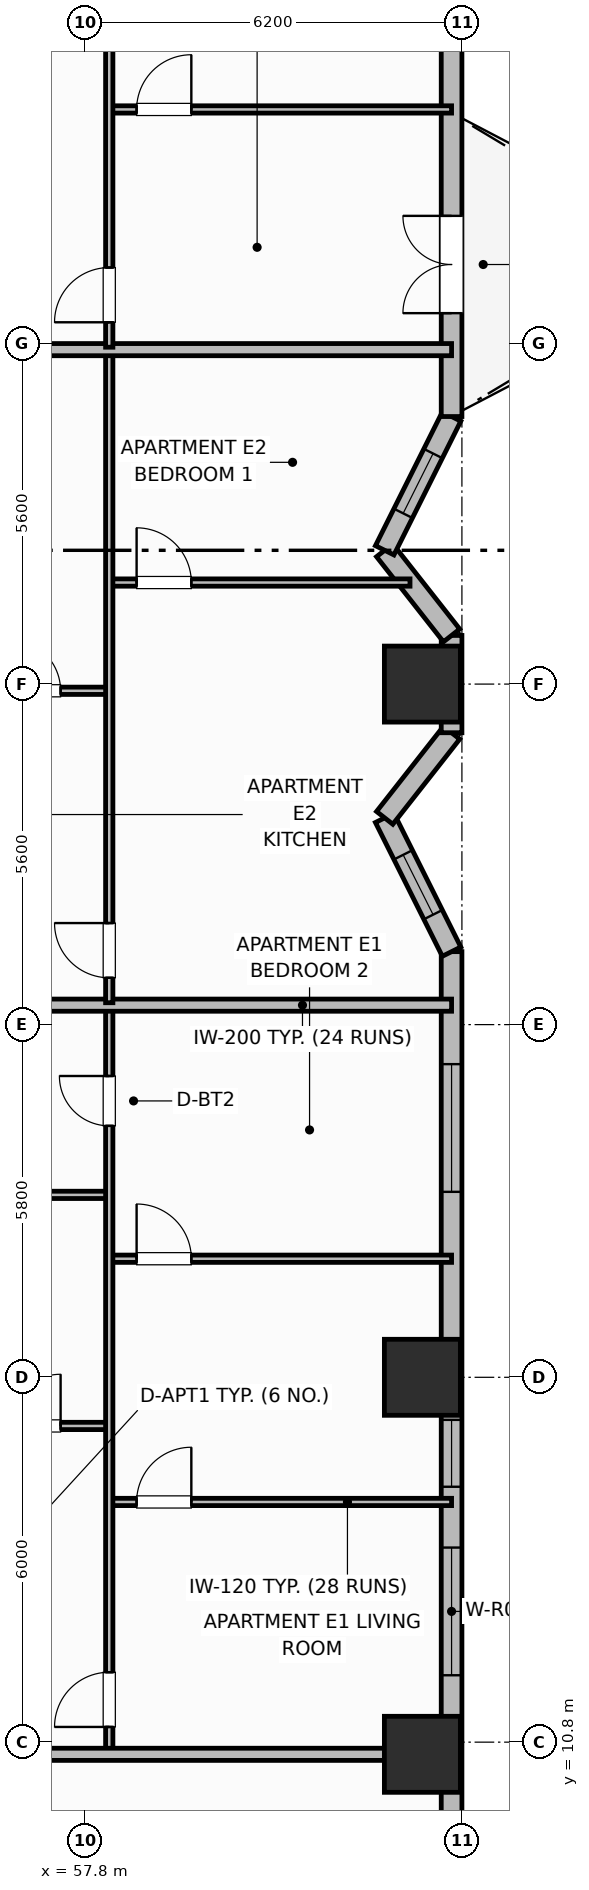
"""IFC4 building model, lengths in metres.
Left out: names, types, materials, properties, quantities, classifications, styles, units other than length and angle.
Written with IfcOpenShell. Run it as: python <this file> out.ifc"""

import sys

from ifc_helpers import new_model, si_unit, direction, frame, frame_2d, origin, origin_2d, place, context, subcontext, project, spatial, rectangle, extrude, element, fill, save


model = new_model("IFC4")
c1 = context("Model", 3, precision=1e-05, world=origin(), true_north=direction((0.0, 1.0)))
c2 = subcontext(c1, "Body", "Model", "MODEL_VIEW")
j1 = project(units=[si_unit("LENGTHUNIT", "METRE"), si_unit("PLANEANGLEUNIT", "RADIAN")], contexts=[c1])
p1 = place(None, origin())
s1 = spatial("IfcSite", under=j1, at=p1, CompositionType="ELEMENT")
p2 = place(p1, origin())
s2 = spatial("IfcBuilding", under=s1, at=p2, CompositionType="ELEMENT")
p3 = place(p2, frame((0.0, 0.0, 73.2)))
s3 = spatial("IfcBuildingStorey", under=s2, at=p3, CompositionType="ELEMENT", Elevation=73.2)
for number, where, z_axis, x_axis in (
    (1, (63.35, 10.6, 0.0), (0.0, 0.0, 1.0), (1.0, 0.0, 0.0)),
    (2, (63.35, 16.8, 0.0), (0.0, 0.0, 1.0), (1.0, 0.0, 0.0)),
    (3, (63.35, 28.2, 0.0), (0.0, 0.0, 1.0), (1.0, 0.0, 0.0)),
):
    element("IfcColumn", number, at=place(p3, frame(where, z_axis=z_axis, x_axis=x_axis)), inside=s3, PredefinedType="COLUMN", context=c2, shape_type="SweptSolid", body=[
        extrude(rectangle(XDim=1.25, YDim=1.25, at=origin_2d()), origin(), (0.0, 0.0, 1.0), 3.7),
    ])
p4 = place(p3, frame((63.83, 9.0, 0.0), z_axis=(0.0, 0.0, 1.0), x_axis=(0.0, 1.0, 0.0)))
e4 = element("IfcWall", 4, at=p4, inside=s3, PredefinedType="SOLIDWALL", context=c2, shape_type="SweptSolid", body=[
    extrude(rectangle(XDim=14.8, YDim=0.34, at=frame_2d((7.4, 0.0))), origin(), (0.0, 0.0, 1.0), 2.66),
])
p5 = place(p4, frame((2.9, 0.0, 0.64)))
e5 = element("IfcOpeningElement", 5, at=p5, cuts=e4, PredefinedType="OPENING", context=c2, shape_type="SweptSolid", body=[
    extrude(rectangle(XDim=2.1, YDim=1.9, at=frame_2d((1.05, 0.95))), frame((0.0, 0.18, 0.0), z_axis=(0.0, -1.0, 0.0), x_axis=(1.0, 0.0, 0.0)), (0.0, 0.0, 1.0), 0.36),
])
p6 = place(p4, frame((6.0, 0.0, 0.85)))
e6 = element("IfcOpeningElement", 6, at=p6, cuts=e4, PredefinedType="OPENING", context=c2, shape_type="SweptSolid", body=[
    extrude(rectangle(XDim=1.1, YDim=1.65, at=frame_2d((0.55, 0.825))), frame((0.0, 0.18, 0.0), z_axis=(0.0, -1.0, 0.0), x_axis=(1.0, 0.0, 0.0)), (0.0, 0.0, 1.0), 0.36),
])
p7 = place(p4, frame((10.85, 0.0, 0.64)))
e7 = element("IfcOpeningElement", 7, at=p7, cuts=e4, PredefinedType="OPENING", context=c2, shape_type="SweptSolid", body=[
    extrude(rectangle(XDim=2.1, YDim=1.9, at=frame_2d((1.05, 0.95))), frame((0.0, 0.18, 0.0), z_axis=(0.0, -1.0, 0.0), x_axis=(1.0, 0.0, 0.0)), (0.0, 0.0, 1.0), 0.36),
])
p8 = place(p3, frame((63.83, 23.8, 0.0), z_axis=(0.0, 0.0, 1.0), x_axis=(-0.447253297971, 0.894407338663, 0.0)))
e8 = element("IfcWall", 8, at=p8, inside=s3, PredefinedType="SOLIDWALL", context=c2, shape_type="SweptSolid", body=[
    extrude(rectangle(XDim=2.46, YDim=0.34, at=frame_2d((1.23, 0.0))), origin(), (0.0, 0.0, 1.0), 2.66),
])
p9 = place(p8, frame((0.68, 0.0, 0.85)))
e9 = element("IfcOpeningElement", 9, at=p9, cuts=e8, PredefinedType="OPENING", context=c2, shape_type="SweptSolid", body=[
    extrude(rectangle(XDim=1.1, YDim=1.65, at=frame_2d((0.55, 0.825))), frame((0.0, 0.18, 0.0), z_axis=(0.0, -1.0, 0.0), x_axis=(1.0, 0.0, 0.0)), (0.0, 0.0, 1.0), 0.36),
])
p10 = place(p3, frame((62.73, 26.0, 0.0), z_axis=(0.0, 0.0, 1.0), x_axis=(0.617882109729, 0.786270753925, 0.0)))
e10 = element("IfcWall", 10, at=p10, inside=s3, PredefinedType="SOLIDWALL", context=c2, shape_type="SweptSolid", body=[
    extrude(rectangle(XDim=1.781, YDim=0.34, at=frame_2d((0.89, 0.0))), origin(), (0.0, 0.0, 1.0), 2.66),
])
p11 = place(p3, frame((63.83, 27.4, 0.0), z_axis=(0.0, 0.0, 1.0), x_axis=(0.0, 1.0, 0.0)))
e11 = element("IfcWall", 11, at=p11, inside=s3, PredefinedType="SOLIDWALL", context=c2, shape_type="SweptSolid", body=[
    extrude(rectangle(XDim=1.6, YDim=0.34, at=frame_2d((0.8, 0.0))), origin(), (0.0, 0.0, 1.0), 2.66),
])
p12 = place(p3, frame((63.83, 29.0, 0.0), z_axis=(0.0, 0.0, 1.0), x_axis=(-0.617882109729, 0.786270753925, 0.0)))
e12 = element("IfcWall", 12, at=p12, inside=s3, PredefinedType="SOLIDWALL", context=c2, shape_type="SweptSolid", body=[
    extrude(rectangle(XDim=1.781, YDim=0.34, at=frame_2d((0.89, 0.0))), origin(), (0.0, 0.0, 1.0), 2.66),
])
p13 = place(p3, frame((62.73, 30.4, 0.0), z_axis=(0.0, 0.0, 1.0), x_axis=(0.4472135955, 0.894427191, 0.0)))
e13 = element("IfcWall", 13, at=p13, inside=s3, PredefinedType="SOLIDWALL", context=c2, shape_type="SweptSolid", body=[
    extrude(rectangle(XDim=2.46, YDim=0.34, at=frame_2d((1.23, 0.0))), origin(), (0.0, 0.0, 1.0), 2.66),
])
p14 = place(p13, frame((0.68, 0.0, 0.85)))
e14 = element("IfcOpeningElement", 14, at=p14, cuts=e13, PredefinedType="OPENING", context=c2, shape_type="SweptSolid", body=[
    extrude(rectangle(XDim=1.1, YDim=1.65, at=frame_2d((0.55, 0.825))), frame((0.0, 0.18, 0.0), z_axis=(0.0, -1.0, 0.0), x_axis=(1.0, 0.0, 0.0)), (0.0, 0.0, 1.0), 0.36),
])
p15 = place(p3, frame((63.83, 32.6, 0.0), z_axis=(0.0, 0.0, 1.0), x_axis=(0.0, 1.0, 0.0)))
e15 = element("IfcWall", 15, at=p15, inside=s3, PredefinedType="SOLIDWALL", context=c2, shape_type="SweptSolid", body=[
    extrude(rectangle(XDim=14.8, YDim=0.34, at=frame_2d((7.4, 0.0))), origin(), (0.0, 0.0, 1.0), 2.66),
])
p16 = place(p15, frame((1.7, 0.0, 0.0)))
e16 = element("IfcOpeningElement", 16, at=p16, cuts=e15, PredefinedType="OPENING", context=c2, shape_type="SweptSolid", body=[
    extrude(rectangle(XDim=1.6, YDim=2.1, at=frame_2d((0.8, 1.05))), frame((0.0, 0.18, 0.0), z_axis=(0.0, -1.0, 0.0), x_axis=(1.0, 0.0, 0.0)), (0.0, 0.0, 1.0), 0.36),
])
p17 = place(p15, frame((7.68, 0.0, 0.85)))
e17 = element("IfcOpeningElement", 17, at=p17, cuts=e15, PredefinedType="OPENING", context=c2, shape_type="SweptSolid", body=[
    extrude(rectangle(XDim=1.1, YDim=1.65, at=frame_2d((0.55, 0.825))), frame((0.0, 0.18, 0.0), z_axis=(0.0, -1.0, 0.0), x_axis=(1.0, 0.0, 0.0)), (0.0, 0.0, 1.0), 0.36),
])
p18 = place(p15, frame((10.52, 0.0, 0.65)))
e18 = element("IfcOpeningElement", 18, at=p18, cuts=e15, PredefinedType="OPENING", context=c2, shape_type="SweptSolid", body=[
    extrude(rectangle(XDim=1.4, YDim=1.85, at=frame_2d((0.7, 0.925))), frame((0.0, 0.18, 0.0), z_axis=(0.0, -1.0, 0.0), x_axis=(1.0, 0.0, 0.0)), (0.0, 0.0, 1.0), 0.36),
])
p19 = place(p3, frame((55.95, 16.0, 0.0), z_axis=(0.0, 0.0, 1.0), x_axis=(1.0, 0.0, 0.0)))
e19 = element("IfcWall", 19, at=p19, inside=s3, PredefinedType="PARTITIONING", context=c2, shape_type="SweptSolid", body=[
    extrude(rectangle(XDim=2.25, YDim=0.12, at=frame_2d((1.125, 0.0))), origin(), (0.0, 0.0, 1.0), 2.49),
])
p20 = place(p19, frame((0.6, 0.0, 0.0)))
e20 = element("IfcOpeningElement", 20, at=p20, cuts=e19, PredefinedType="OPENING", context=c2, shape_type="SweptSolid", body=[
    extrude(rectangle(XDim=0.85, YDim=2.1, at=frame_2d((0.425, 1.05))), frame((0.0, 0.07, 0.0), z_axis=(0.0, -1.0, 0.0), x_axis=(1.0, 0.0, 0.0)), (0.0, 0.0, 1.0), 0.14),
])
p21 = place(p3, frame((55.95, 19.8, 0.0), z_axis=(0.0, 0.0, 1.0), x_axis=(1.0, 0.0, 0.0)))
e21 = element("IfcWall", 21, at=p21, inside=s3, PredefinedType="PARTITIONING", context=c2, shape_type="SweptSolid", body=[
    extrude(rectangle(XDim=2.25, YDim=0.12, at=frame_2d((1.125, 0.0))), origin(), (0.0, 0.0, 1.0), 2.49),
])
p22 = place(p3, frame((58.2, 14.75, 0.0), z_axis=(0.0, 0.0, 1.0), x_axis=(1.0, 0.0, 0.0)))
e22 = element("IfcWall", 22, at=p22, inside=s3, PredefinedType="PARTITIONING", context=c2, shape_type="SweptSolid", body=[
    extrude(rectangle(XDim=5.63, YDim=0.12, at=frame_2d((2.815, 0.0))), origin(), (0.0, 0.0, 1.0), 2.49),
])
p23 = place(p22, frame((0.45, 0.0, 0.0)))
e23 = element("IfcOpeningElement", 23, at=p23, cuts=e22, PredefinedType="OPENING", context=c2, shape_type="SweptSolid", body=[
    extrude(rectangle(XDim=0.9, YDim=2.1, at=frame_2d((0.45, 1.05))), frame((0.0, 0.07, 0.0), z_axis=(0.0, -1.0, 0.0), x_axis=(1.0, 0.0, 0.0)), (0.0, 0.0, 1.0), 0.14),
])
p24 = place(p3, frame((58.2, 18.75, 0.0), z_axis=(0.0, 0.0, 1.0), x_axis=(1.0, 0.0, 0.0)))
e24 = element("IfcWall", 24, at=p24, inside=s3, PredefinedType="PARTITIONING", context=c2, shape_type="SweptSolid", body=[
    extrude(rectangle(XDim=5.63, YDim=0.12, at=frame_2d((2.815, 0.0))), origin(), (0.0, 0.0, 1.0), 2.49),
])
p25 = place(p24, frame((0.45, 0.0, 0.0)))
e25 = element("IfcOpeningElement", 25, at=p25, cuts=e24, PredefinedType="OPENING", context=c2, shape_type="SweptSolid", body=[
    extrude(rectangle(XDim=0.9, YDim=2.1, at=frame_2d((0.45, 1.05))), frame((0.0, 0.07, 0.0), z_axis=(0.0, -1.0, 0.0), x_axis=(1.0, 0.0, 0.0)), (0.0, 0.0, 1.0), 0.14),
])
p26 = place(p3, frame((58.2, 10.64, 0.0), z_axis=(0.0, 0.0, 1.0), x_axis=(0.0, 1.0, 0.0)))
e26 = element("IfcWall", 26, at=p26, inside=s3, PredefinedType="PARTITIONING", context=c2, shape_type="SweptSolid", body=[
    extrude(rectangle(XDim=12.24, YDim=0.12, at=frame_2d((6.12, 0.0))), origin(), (0.0, 0.0, 1.0), 2.49),
])
p27 = place(p26, frame((0.41, 0.0, 0.0)))
e27 = element("IfcOpeningElement", 27, at=p27, cuts=e26, PredefinedType="OPENING", context=c2, shape_type="SweptSolid", body=[
    extrude(rectangle(XDim=0.9, YDim=2.1, at=frame_2d((0.45, 1.05))), frame((0.0, 0.07, 0.0), z_axis=(0.0, -1.0, 0.0), x_axis=(1.0, 0.0, 0.0)), (0.0, 0.0, 1.0), 0.14),
])
p28 = place(p26, frame((10.295, 0.0, 0.0)))
e28 = element("IfcOpeningElement", 28, at=p28, cuts=e26, PredefinedType="OPENING", context=c2, shape_type="SweptSolid", body=[
    extrude(rectangle(XDim=0.82, YDim=2.08, at=frame_2d((0.41, 1.04))), frame((0.0, 0.07, 0.0), z_axis=(0.0, -1.0, 0.0), x_axis=(1.0, 0.0, 0.0)), (0.0, 0.0, 1.0), 0.14),
])
p29 = place(p3, frame((55.95, 22.92, 0.0), z_axis=(0.0, 0.0, 1.0), x_axis=(1.0, 0.0, 0.0)))
e29 = element("IfcWall", 29, at=p29, inside=s3, PredefinedType="PARTITIONING", context=c2, shape_type="SweptSolid", body=[
    extrude(rectangle(XDim=7.88, YDim=0.2, at=frame_2d((3.94, 0.0))), origin(), (0.0, 0.0, 1.0), 2.49),
])
p30 = place(p3, frame((55.95, 28.09, 0.0), z_axis=(0.0, 0.0, 1.0), x_axis=(1.0, 0.0, 0.0)))
e30 = element("IfcWall", 30, at=p30, inside=s3, PredefinedType="PARTITIONING", context=c2, shape_type="SweptSolid", body=[
    extrude(rectangle(XDim=2.25, YDim=0.12, at=frame_2d((1.125, 0.0))), origin(), (0.0, 0.0, 1.0), 2.49),
])
p31 = place(p30, frame((0.6, 0.0, 0.0)))
e31 = element("IfcOpeningElement", 31, at=p31, cuts=e30, PredefinedType="OPENING", context=c2, shape_type="SweptSolid", body=[
    extrude(rectangle(XDim=0.85, YDim=2.1, at=frame_2d((0.425, 1.05))), frame((0.0, 0.07, 0.0), z_axis=(0.0, -1.0, 0.0), x_axis=(1.0, 0.0, 0.0)), (0.0, 0.0, 1.0), 0.14),
])
p32 = place(p3, frame((58.2, 29.87, 0.0), z_axis=(0.0, 0.0, 1.0), x_axis=(1.0, 0.0, 0.0)))
e32 = element("IfcWall", 32, at=p32, inside=s3, PredefinedType="PARTITIONING", context=c2, shape_type="SweptSolid", body=[
    extrude(rectangle(XDim=4.947, YDim=0.12, at=frame_2d((2.473, 0.0))), origin(), (0.0, 0.0, 1.0), 2.49),
])
p33 = place(p32, frame((0.45, 0.0, 0.0)))
e33 = element("IfcOpeningElement", 33, at=p33, cuts=e32, PredefinedType="OPENING", context=c2, shape_type="SweptSolid", body=[
    extrude(rectangle(XDim=0.9, YDim=2.1, at=frame_2d((0.45, 1.05))), frame((0.0, 0.07, 0.0), z_axis=(0.0, -1.0, 0.0), x_axis=(1.0, 0.0, 0.0)), (0.0, 0.0, 1.0), 0.14),
])
p34 = place(p3, frame((58.2, 22.96, 0.0), z_axis=(0.0, 0.0, 1.0), x_axis=(0.0, 1.0, 0.0)))
e34 = element("IfcWall", 34, at=p34, inside=s3, PredefinedType="PARTITIONING", context=c2, shape_type="SweptSolid", body=[
    extrude(rectangle(XDim=10.7, YDim=0.12, at=frame_2d((5.35, 0.0))), origin(), (0.0, 0.0, 1.0), 2.49),
])
p35 = place(p34, frame((0.41, 0.0, 0.0)))
e35 = element("IfcOpeningElement", 35, at=p35, cuts=e34, PredefinedType="OPENING", context=c2, shape_type="SweptSolid", body=[
    extrude(rectangle(XDim=0.9, YDim=2.1, at=frame_2d((0.45, 1.05))), frame((0.0, 0.07, 0.0), z_axis=(0.0, -1.0, 0.0), x_axis=(1.0, 0.0, 0.0)), (0.0, 0.0, 1.0), 0.14),
])
p36 = place(p3, frame((55.95, 33.7, 0.0), z_axis=(0.0, 0.0, 1.0), x_axis=(1.0, 0.0, 0.0)))
e36 = element("IfcWall", 36, at=p36, inside=s3, PredefinedType="PARTITIONING", context=c2, shape_type="SweptSolid", body=[
    extrude(rectangle(XDim=7.88, YDim=0.2, at=frame_2d((3.94, 0.0))), origin(), (0.0, 0.0, 1.0), 2.49),
])
p37 = place(p3, frame((58.2, 37.65, 0.0), z_axis=(0.0, 0.0, 1.0), x_axis=(1.0, 0.0, 0.0)))
e37 = element("IfcWall", 37, at=p37, inside=s3, PredefinedType="PARTITIONING", context=c2, shape_type="SweptSolid", body=[
    extrude(rectangle(XDim=5.63, YDim=0.12, at=frame_2d((2.815, 0.0))), origin(), (0.0, 0.0, 1.0), 2.49),
])
p38 = place(p37, frame((0.45, 0.0, 0.0)))
e38 = element("IfcOpeningElement", 38, at=p38, cuts=e37, PredefinedType="OPENING", context=c2, shape_type="SweptSolid", body=[
    extrude(rectangle(XDim=0.9, YDim=2.1, at=frame_2d((0.45, 1.05))), frame((0.0, 0.07, 0.0), z_axis=(0.0, -1.0, 0.0), x_axis=(1.0, 0.0, 0.0)), (0.0, 0.0, 1.0), 0.14),
])
p39 = place(p3, frame((58.2, 33.74, 0.0), z_axis=(0.0, 0.0, 1.0), x_axis=(0.0, 1.0, 0.0)))
e39 = element("IfcWall", 39, at=p39, inside=s3, PredefinedType="PARTITIONING", context=c2, shape_type="SweptSolid", body=[
    extrude(rectangle(XDim=12.02, YDim=0.12, at=frame_2d((6.01, 0.0))), origin(), (0.0, 0.0, 1.0), 2.49),
])
p40 = place(p39, frame((0.41, 0.0, 0.0)))
e40 = element("IfcOpeningElement", 40, at=p40, cuts=e39, PredefinedType="OPENING", context=c2, shape_type="SweptSolid", body=[
    extrude(rectangle(XDim=0.9, YDim=2.1, at=frame_2d((0.45, 1.05))), frame((0.0, 0.07, 0.0), z_axis=(0.0, -1.0, 0.0), x_axis=(1.0, 0.0, 0.0)), (0.0, 0.0, 1.0), 0.14),
])
p41 = place(p39, frame((10.185, 0.0, 0.0)))
e41 = element("IfcOpeningElement", 41, at=p41, cuts=e39, PredefinedType="OPENING", context=c2, shape_type="SweptSolid", body=[
    extrude(rectangle(XDim=0.82, YDim=2.08, at=frame_2d((0.41, 1.04))), frame((0.0, 0.07, 0.0), z_axis=(0.0, -1.0, 0.0), x_axis=(1.0, 0.0, 0.0)), (0.0, 0.0, 1.0), 0.14),
])
p42 = place(p3, frame((55.95, 10.6, 0.0), z_axis=(0.0, 0.0, 1.0), x_axis=(1.0, 0.0, 0.0)))
e42 = element("IfcWall", 42, at=p42, inside=s3, PredefinedType="PARTITIONING", context=c2, shape_type="SweptSolid", body=[
    extrude(rectangle(XDim=7.46, YDim=0.2, at=frame_2d((3.73, 0.0))), origin(), (0.0, 0.0, 1.0), 2.49),
])
p43 = place(p5, origin())
e43 = element("IfcWindow", 43, at=p43, inside=s3, PartitioningType="SINGLE_PANEL", PredefinedType="WINDOW", context=c2, shape_type="SweptSolid", body=[
    extrude(rectangle(XDim=2.1, YDim=1.9, at=frame_2d((1.05, 0.95))), frame((0.0, 0.03, 0.0), z_axis=(0.0, -1.0, 0.0), x_axis=(1.0, 0.0, 0.0)), (0.0, 0.0, 1.0), 0.06),
])
fill(e5, e43)
p44 = place(p6, origin())
e44 = element("IfcWindow", 44, at=p44, inside=s3, PartitioningType="SINGLE_PANEL", PredefinedType="WINDOW", context=c2, shape_type="SweptSolid", body=[
    extrude(rectangle(XDim=1.1, YDim=1.65, at=frame_2d((0.55, 0.825))), frame((0.0, 0.03, 0.0), z_axis=(0.0, -1.0, 0.0), x_axis=(1.0, 0.0, 0.0)), (0.0, 0.0, 1.0), 0.06),
])
fill(e6, e44)
p45 = place(p7, origin())
e45 = element("IfcWindow", 45, at=p45, inside=s3, PartitioningType="SINGLE_PANEL", PredefinedType="WINDOW", context=c2, shape_type="SweptSolid", body=[
    extrude(rectangle(XDim=2.1, YDim=1.9, at=frame_2d((1.05, 0.95))), frame((0.0, 0.03, 0.0), z_axis=(0.0, -1.0, 0.0), x_axis=(1.0, 0.0, 0.0)), (0.0, 0.0, 1.0), 0.06),
])
fill(e7, e45)
p46 = place(p9, origin())
e46 = element("IfcWindow", 46, at=p46, inside=s3, PartitioningType="SINGLE_PANEL", PredefinedType="WINDOW", context=c2, shape_type="SweptSolid", body=[
    extrude(rectangle(XDim=1.1, YDim=1.65, at=frame_2d((0.55, 0.825))), frame((0.0, 0.03, 0.0), z_axis=(0.0, -1.0, 0.0), x_axis=(1.0, 0.0, 0.0)), (0.0, 0.0, 1.0), 0.06),
])
fill(e9, e46)
p47 = place(p14, origin())
e47 = element("IfcWindow", 47, at=p47, inside=s3, PartitioningType="SINGLE_PANEL", PredefinedType="WINDOW", context=c2, shape_type="SweptSolid", body=[
    extrude(rectangle(XDim=1.1, YDim=1.65, at=frame_2d((0.55, 0.825))), frame((0.0, 0.03, 0.0), z_axis=(0.0, -1.0, 0.0), x_axis=(1.0, 0.0, 0.0)), (0.0, 0.0, 1.0), 0.06),
])
fill(e14, e47)
p48 = place(p16, origin())
e48 = element("IfcDoor", 48, at=p48, inside=s3, OperationType="DOUBLE_DOOR_SINGLE_SWING", PredefinedType="DOOR", context=c2, shape_type="SweptSolid", body=[
    extrude(rectangle(XDim=1.6, YDim=2.1, at=frame_2d((0.8, 1.05))), frame((0.0, 0.025, 0.0), z_axis=(0.0, -1.0, 0.0), x_axis=(1.0, 0.0, 0.0)), (0.0, 0.0, 1.0), 0.05),
])
fill(e16, e48)
p49 = place(p20, origin())
e49 = element("IfcDoor", 49, at=p49, inside=s3, OperationType="SINGLE_SWING_RIGHT", PredefinedType="DOOR", context=c2, shape_type="SweptSolid", body=[
    extrude(rectangle(XDim=0.85, YDim=2.1, at=frame_2d((0.425, 1.05))), frame((0.0, 0.025, 0.0), z_axis=(0.0, -1.0, 0.0), x_axis=(1.0, 0.0, 0.0)), (0.0, 0.0, 1.0), 0.05),
])
fill(e20, e49)
p50 = place(p23, origin())
e50 = element("IfcDoor", 50, at=p50, inside=s3, OperationType="SINGLE_SWING_RIGHT", PredefinedType="DOOR", context=c2, shape_type="SweptSolid", body=[
    extrude(rectangle(XDim=0.9, YDim=2.1, at=frame_2d((0.45, 1.05))), frame((0.0, 0.025, 0.0), z_axis=(0.0, -1.0, 0.0), x_axis=(1.0, 0.0, 0.0)), (0.0, 0.0, 1.0), 0.05),
])
fill(e23, e50)
p51 = place(p25, origin())
e51 = element("IfcDoor", 51, at=p51, inside=s3, OperationType="SINGLE_SWING_LEFT", PredefinedType="DOOR", context=c2, shape_type="SweptSolid", body=[
    extrude(rectangle(XDim=0.9, YDim=2.1, at=frame_2d((0.45, 1.05))), frame((0.0, 0.025, 0.0), z_axis=(0.0, -1.0, 0.0), x_axis=(1.0, 0.0, 0.0)), (0.0, 0.0, 1.0), 0.05),
])
fill(e25, e51)
p52 = place(p27, origin())
e52 = element("IfcDoor", 52, at=p52, inside=s3, OperationType="SINGLE_SWING_LEFT", PredefinedType="DOOR", context=c2, shape_type="SweptSolid", body=[
    extrude(rectangle(XDim=0.9, YDim=2.1, at=frame_2d((0.45, 1.05))), frame((0.0, 0.025, 0.0), z_axis=(0.0, -1.0, 0.0), x_axis=(1.0, 0.0, 0.0)), (0.0, 0.0, 1.0), 0.05),
])
fill(e27, e52)
p53 = place(p28, origin())
e53 = element("IfcDoor", 53, at=p53, inside=s3, OperationType="SINGLE_SWING_RIGHT", PredefinedType="DOOR", context=c2, shape_type="SweptSolid", body=[
    extrude(rectangle(XDim=0.82, YDim=2.08, at=frame_2d((0.41, 1.04))), frame((0.0, 0.025, 0.0), z_axis=(0.0, -1.0, 0.0), x_axis=(1.0, 0.0, 0.0)), (0.0, 0.0, 1.0), 0.05),
])
fill(e28, e53)
p54 = place(p31, origin())
e54 = element("IfcDoor", 54, at=p54, inside=s3, OperationType="SINGLE_SWING_LEFT", PredefinedType="DOOR", context=c2, shape_type="SweptSolid", body=[
    extrude(rectangle(XDim=0.85, YDim=2.1, at=frame_2d((0.425, 1.05))), frame((0.0, 0.025, 0.0), z_axis=(0.0, -1.0, 0.0), x_axis=(1.0, 0.0, 0.0)), (0.0, 0.0, 1.0), 0.05),
])
fill(e31, e54)
p55 = place(p33, origin())
e55 = element("IfcDoor", 55, at=p55, inside=s3, OperationType="SINGLE_SWING_LEFT", PredefinedType="DOOR", context=c2, shape_type="SweptSolid", body=[
    extrude(rectangle(XDim=0.9, YDim=2.1, at=frame_2d((0.45, 1.05))), frame((0.0, 0.025, 0.0), z_axis=(0.0, -1.0, 0.0), x_axis=(1.0, 0.0, 0.0)), (0.0, 0.0, 1.0), 0.05),
])
fill(e33, e55)
p56 = place(p35, origin())
e56 = element("IfcDoor", 56, at=p56, inside=s3, OperationType="SINGLE_SWING_RIGHT", PredefinedType="DOOR", context=c2, shape_type="SweptSolid", body=[
    extrude(rectangle(XDim=0.9, YDim=2.1, at=frame_2d((0.45, 1.05))), frame((0.0, 0.025, 0.0), z_axis=(0.0, -1.0, 0.0), x_axis=(1.0, 0.0, 0.0)), (0.0, 0.0, 1.0), 0.05),
])
fill(e35, e56)
p57 = place(p38, origin())
e57 = element("IfcDoor", 57, at=p57, inside=s3, OperationType="SINGLE_SWING_RIGHT", PredefinedType="DOOR", context=c2, shape_type="SweptSolid", body=[
    extrude(rectangle(XDim=0.9, YDim=2.1, at=frame_2d((0.45, 1.05))), frame((0.0, 0.025, 0.0), z_axis=(0.0, -1.0, 0.0), x_axis=(1.0, 0.0, 0.0)), (0.0, 0.0, 1.0), 0.05),
])
fill(e38, e57)
p58 = place(p40, origin())
e58 = element("IfcDoor", 58, at=p58, inside=s3, OperationType="SINGLE_SWING_LEFT", PredefinedType="DOOR", context=c2, shape_type="SweptSolid", body=[
    extrude(rectangle(XDim=0.9, YDim=2.1, at=frame_2d((0.45, 1.05))), frame((0.0, 0.025, 0.0), z_axis=(0.0, -1.0, 0.0), x_axis=(1.0, 0.0, 0.0)), (0.0, 0.0, 1.0), 0.05),
])
fill(e40, e58)
save(model, sys.argv[1])
